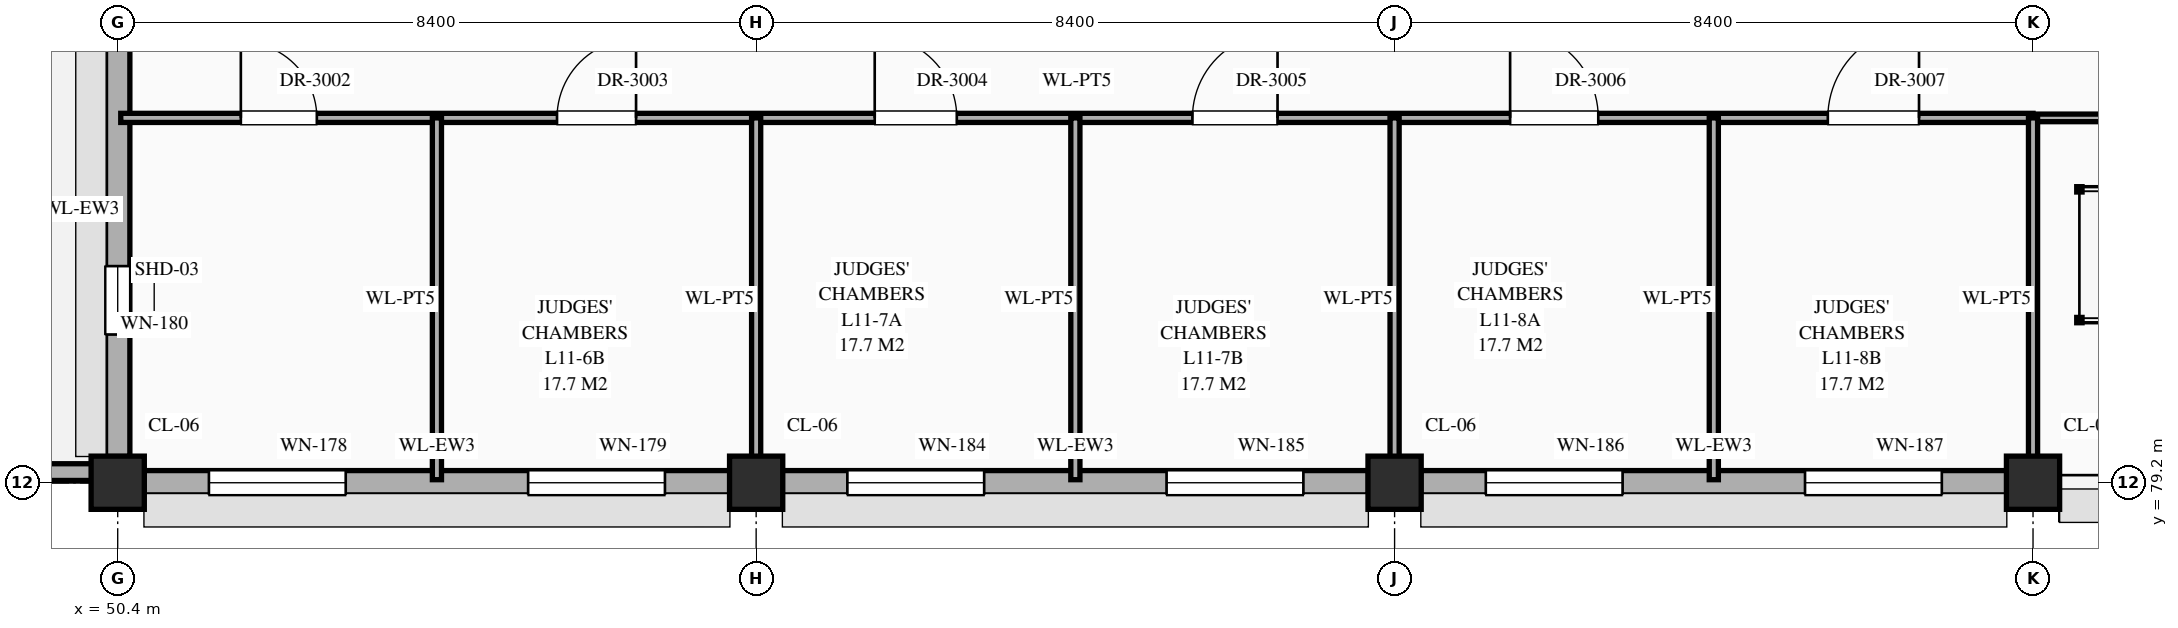
"""IFC4 building model, lengths in metres.
Left out: names, types, materials, properties, quantities, classifications, styles, units other than length and angle.
Written with IfcOpenShell. Run it as: python <this file> out.ifc"""

import sys

from ifc_helpers import new_model, si_unit, direction, frame, frame_2d, origin, origin_2d, place, context, subcontext, project, spatial, rectangle, extrude, element, fill, save


model = new_model("IFC4")
c1 = context("Model", 3, precision=1e-05, world=origin(), true_north=direction((0.0, 1.0)))
c2 = subcontext(c1, "Body", "Model", "MODEL_VIEW")
j1 = project(units=[si_unit("LENGTHUNIT", "METRE"), si_unit("PLANEANGLEUNIT", "RADIAN")], contexts=[c1])
p1 = place(None, origin())
s1 = spatial("IfcSite", under=j1, at=p1, CompositionType="ELEMENT")
p2 = place(p1, origin())
s2 = spatial("IfcBuilding", under=s1, at=p2, CompositionType="ELEMENT")
p3 = place(p2, frame((0.0, 0.0, 47.7)))
s3 = spatial("IfcBuildingStorey", under=s2, at=p3, CompositionType="ELEMENT", Elevation=47.7)
for number, where, z_axis, x_axis in (
    (1, (50.4, 79.2, 0.0), (0.0, 0.0, 1.0), (1.0, 0.0, 0.0)),
    (2, (58.8, 79.2, 0.0), (0.0, 0.0, 1.0), (1.0, 0.0, 0.0)),
    (3, (67.2, 79.2, 0.0), (0.0, 0.0, 1.0), (1.0, 0.0, 0.0)),
    (4, (75.6, 79.2, 0.0), (0.0, 0.0, 1.0), (1.0, 0.0, 0.0)),
):
    element("IfcColumn", number, at=place(p3, frame(where, z_axis=z_axis, x_axis=x_axis)), inside=s3, PredefinedType="COLUMN", context=c2, shape_type="SweptSolid", body=[
        extrude(rectangle(XDim=0.7, YDim=0.7, at=origin_2d()), origin(), (0.0, 0.0, 1.0), 4.2),
    ])
p4 = place(p3, frame((50.745, 79.2, 0.0), z_axis=(0.0, 0.0, 1.0), x_axis=(1.0, 0.0, 0.0)))
e5 = element("IfcWall", 5, at=p4, inside=s3, PredefinedType="STANDARD", context=c2, shape_type="SweptSolid", body=[
    extrude(rectangle(XDim=7.71, YDim=0.32, at=frame_2d((3.855, 0.0))), origin(), (0.0, 0.0, 1.0), 3.31),
])
p5 = place(p4, frame((0.855, 0.0, 0.55)))
e6 = element("IfcOpeningElement", 6, at=p5, cuts=e5, PredefinedType="OPENING", context=c2, shape_type="SweptSolid", body=[
    extrude(rectangle(XDim=1.8, YDim=2.12, at=frame_2d((0.9, 1.06))), frame((0.0, 0.172, 0.0), z_axis=(0.0, -1.0, 0.0), x_axis=(1.0, 0.0, 0.0)), (0.0, 0.0, 1.0), 0.344),
])
p6 = place(p4, frame((5.055, 0.0, 0.55)))
e7 = element("IfcOpeningElement", 7, at=p6, cuts=e5, PredefinedType="OPENING", context=c2, shape_type="SweptSolid", body=[
    extrude(rectangle(XDim=1.8, YDim=2.12, at=frame_2d((0.9, 1.06))), frame((0.0, 0.172, 0.0), z_axis=(0.0, -1.0, 0.0), x_axis=(1.0, 0.0, 0.0)), (0.0, 0.0, 1.0), 0.344),
])
p7 = place(p3, frame((50.4, 79.545, 0.0), z_axis=(0.0, 0.0, 1.0), x_axis=(0.0, 1.0, 0.0)))
e8 = element("IfcWall", 8, at=p7, inside=s3, PredefinedType="STANDARD", context=c2, shape_type="SweptSolid", body=[
    extrude(rectangle(XDim=6.51, YDim=0.32, at=frame_2d((3.255, 0.0))), origin(), (0.0, 0.0, 1.0), 3.31),
])
p8 = place(p7, frame((1.605, 0.0, 0.55)))
e9 = element("IfcOpeningElement", 9, at=p8, cuts=e8, PredefinedType="OPENING", context=c2, shape_type="SweptSolid", body=[
    extrude(rectangle(XDim=0.9, YDim=1.92, at=frame_2d((0.45, 0.96))), frame((0.0, 0.172, 0.0), z_axis=(0.0, -1.0, 0.0), x_axis=(1.0, 0.0, 0.0)), (0.0, 0.0, 1.0), 0.344),
])
p9 = place(p3, frame((59.145, 79.2, 0.0), z_axis=(0.0, 0.0, 1.0), x_axis=(1.0, 0.0, 0.0)))
e10 = element("IfcWall", 10, at=p9, inside=s3, PredefinedType="STANDARD", context=c2, shape_type="SweptSolid", body=[
    extrude(rectangle(XDim=7.71, YDim=0.32, at=frame_2d((3.855, 0.0))), origin(), (0.0, 0.0, 1.0), 3.31),
])
p10 = place(p9, frame((0.855, 0.0, 0.55)))
e11 = element("IfcOpeningElement", 11, at=p10, cuts=e10, PredefinedType="OPENING", context=c2, shape_type="SweptSolid", body=[
    extrude(rectangle(XDim=1.8, YDim=2.12, at=frame_2d((0.9, 1.06))), frame((0.0, 0.172, 0.0), z_axis=(0.0, -1.0, 0.0), x_axis=(1.0, 0.0, 0.0)), (0.0, 0.0, 1.0), 0.344),
])
p11 = place(p9, frame((5.055, 0.0, 0.55)))
e12 = element("IfcOpeningElement", 12, at=p11, cuts=e10, PredefinedType="OPENING", context=c2, shape_type="SweptSolid", body=[
    extrude(rectangle(XDim=1.8, YDim=2.12, at=frame_2d((0.9, 1.06))), frame((0.0, 0.172, 0.0), z_axis=(0.0, -1.0, 0.0), x_axis=(1.0, 0.0, 0.0)), (0.0, 0.0, 1.0), 0.344),
])
p12 = place(p3, frame((67.545, 79.2, 0.0), z_axis=(0.0, 0.0, 1.0), x_axis=(1.0, 0.0, 0.0)))
e13 = element("IfcWall", 13, at=p12, inside=s3, PredefinedType="STANDARD", context=c2, shape_type="SweptSolid", body=[
    extrude(rectangle(XDim=7.71, YDim=0.32, at=frame_2d((3.855, 0.0))), origin(), (0.0, 0.0, 1.0), 3.31),
])
p13 = place(p12, frame((0.855, 0.0, 0.55)))
e14 = element("IfcOpeningElement", 14, at=p13, cuts=e13, PredefinedType="OPENING", context=c2, shape_type="SweptSolid", body=[
    extrude(rectangle(XDim=1.8, YDim=2.12, at=frame_2d((0.9, 1.06))), frame((0.0, 0.172, 0.0), z_axis=(0.0, -1.0, 0.0), x_axis=(1.0, 0.0, 0.0)), (0.0, 0.0, 1.0), 0.344),
])
p14 = place(p12, frame((5.055, 0.0, 0.55)))
e15 = element("IfcOpeningElement", 15, at=p14, cuts=e13, PredefinedType="OPENING", context=c2, shape_type="SweptSolid", body=[
    extrude(rectangle(XDim=1.8, YDim=2.12, at=frame_2d((0.9, 1.06))), frame((0.0, 0.172, 0.0), z_axis=(0.0, -1.0, 0.0), x_axis=(1.0, 0.0, 0.0)), (0.0, 0.0, 1.0), 0.344),
])
p15 = place(p3, frame((42.14, 79.34, 0.0), z_axis=(0.0, 0.0, 1.0), x_axis=(1.0, 0.0, 0.0)))
e16 = element("IfcWall", 16, at=p15, inside=s3, PredefinedType="PARAPET", context=c2, shape_type="SweptSolid", body=[
    extrude(rectangle(XDim=7.96, YDim=0.22, at=frame_2d((3.98, 0.0))), origin(), (0.0, 0.0, 1.0), 1.2),
])
p16 = place(p3, frame((50.44, 84.0, 0.0), z_axis=(0.0, 0.0, 1.0), x_axis=(1.0, 0.0, 0.0)))
e17 = element("IfcWall", 17, at=p16, inside=s3, PredefinedType="STANDARD", context=c2, shape_type="SweptSolid", body=[
    extrude(rectangle(XDim=25.16, YDim=0.12, at=frame_2d((12.58, 0.0))), origin(), (0.0, 0.0, 1.0), 3.96),
])
p17 = place(p16, frame((1.58, 0.0, 0.0)))
e18 = element("IfcOpeningElement", 18, at=p17, cuts=e17, PredefinedType="OPENING", context=c2, shape_type="SweptSolid", body=[
    extrude(rectangle(XDim=1.0, YDim=2.25, at=frame_2d((0.5, 1.125))), frame((0.0, 0.072, 0.0), z_axis=(0.0, -1.0, 0.0), x_axis=(1.0, 0.0, 0.0)), (0.0, 0.0, 1.0), 0.144),
])
p18 = place(p16, frame((5.74, 0.0, 0.0)))
e19 = element("IfcOpeningElement", 19, at=p18, cuts=e17, PredefinedType="OPENING", context=c2, shape_type="SweptSolid", body=[
    extrude(rectangle(XDim=1.04, YDim=2.2, at=frame_2d((0.52, 1.1))), frame((0.0, 0.072, 0.0), z_axis=(0.0, -1.0, 0.0), x_axis=(1.0, 0.0, 0.0)), (0.0, 0.0, 1.0), 0.144),
])
p19 = place(p16, frame((9.92, 0.0, 0.0)))
e20 = element("IfcOpeningElement", 20, at=p19, cuts=e17, PredefinedType="OPENING", context=c2, shape_type="SweptSolid", body=[
    extrude(rectangle(XDim=1.08, YDim=2.25, at=frame_2d((0.54, 1.125))), frame((0.0, 0.072, 0.0), z_axis=(0.0, -1.0, 0.0), x_axis=(1.0, 0.0, 0.0)), (0.0, 0.0, 1.0), 0.144),
])
p20 = place(p16, frame((14.1, 0.0, 0.0)))
e21 = element("IfcOpeningElement", 21, at=p20, cuts=e17, PredefinedType="OPENING", context=c2, shape_type="SweptSolid", body=[
    extrude(rectangle(XDim=1.12, YDim=2.25, at=frame_2d((0.56, 1.125))), frame((0.0, 0.072, 0.0), z_axis=(0.0, -1.0, 0.0), x_axis=(1.0, 0.0, 0.0)), (0.0, 0.0, 1.0), 0.144),
])
p21 = place(p16, frame((18.28, 0.0, 0.0)))
e22 = element("IfcOpeningElement", 22, at=p21, cuts=e17, PredefinedType="OPENING", context=c2, shape_type="SweptSolid", body=[
    extrude(rectangle(XDim=1.16, YDim=2.3, at=frame_2d((0.58, 1.15))), frame((0.0, 0.072, 0.0), z_axis=(0.0, -1.0, 0.0), x_axis=(1.0, 0.0, 0.0)), (0.0, 0.0, 1.0), 0.144),
])
p22 = place(p16, frame((22.46, 0.0, 0.0)))
e23 = element("IfcOpeningElement", 23, at=p22, cuts=e17, PredefinedType="OPENING", context=c2, shape_type="SweptSolid", body=[
    extrude(rectangle(XDim=1.2, YDim=2.35, at=frame_2d((0.6, 1.175))), frame((0.0, 0.072, 0.0), z_axis=(0.0, -1.0, 0.0), x_axis=(1.0, 0.0, 0.0)), (0.0, 0.0, 1.0), 0.144),
])
p23 = place(p3, frame((75.6, 84.0, 0.0), z_axis=(0.0, 0.0, 1.0), x_axis=(1.0, 0.0, 0.0)))
e24 = element("IfcWall", 24, at=p23, inside=s3, PredefinedType="STANDARD", context=c2, shape_type="SweptSolid", body=[
    extrude(rectangle(XDim=16.8, YDim=0.1, at=frame_2d((8.4, 0.0))), origin(), (0.0, 0.0, 1.0), 3.96),
])
p24 = place(p23, frame((3.58, 0.0, 0.0)))
e25 = element("IfcOpeningElement", 25, at=p24, cuts=e24, PredefinedType="OPENING", context=c2, shape_type="SweptSolid", body=[
    extrude(rectangle(XDim=1.24, YDim=2.3, at=frame_2d((0.62, 1.15))), frame((0.0, 0.062, 0.0), z_axis=(0.0, -1.0, 0.0), x_axis=(1.0, 0.0, 0.0)), (0.0, 0.0, 1.0), 0.124),
])
p25 = place(p23, frame((11.96, 0.0, 0.0)))
e26 = element("IfcOpeningElement", 26, at=p25, cuts=e24, PredefinedType="OPENING", context=c2, shape_type="SweptSolid", body=[
    extrude(rectangle(XDim=1.28, YDim=2.35, at=frame_2d((0.64, 1.175))), frame((0.0, 0.062, 0.0), z_axis=(0.0, -1.0, 0.0), x_axis=(1.0, 0.0, 0.0)), (0.0, 0.0, 1.0), 0.124),
])
p26 = place(p3, frame((54.6, 79.24, 0.0), z_axis=(0.0, 0.0, 1.0), x_axis=(0.0, 1.0, 0.0)))
e27 = element("IfcWall", 27, at=p26, inside=s3, PredefinedType="STANDARD", context=c2, shape_type="SweptSolid", body=[
    extrude(rectangle(XDim=4.76, YDim=0.12, at=frame_2d((2.38, 0.0))), origin(), (0.0, 0.0, 1.0), 3.96),
])
p27 = place(p3, frame((58.8, 79.24, 0.0), z_axis=(0.0, 0.0, 1.0), x_axis=(0.0, 1.0, 0.0)))
e28 = element("IfcWall", 28, at=p27, inside=s3, PredefinedType="STANDARD", context=c2, shape_type="SweptSolid", body=[
    extrude(rectangle(XDim=4.76, YDim=0.12, at=frame_2d((2.38, 0.0))), origin(), (0.0, 0.0, 1.0), 3.21),
])
p28 = place(p3, frame((63.0, 79.24, 0.0), z_axis=(0.0, 0.0, 1.0), x_axis=(0.0, 1.0, 0.0)))
e29 = element("IfcWall", 29, at=p28, inside=s3, PredefinedType="STANDARD", context=c2, shape_type="SweptSolid", body=[
    extrude(rectangle(XDim=4.76, YDim=0.12, at=frame_2d((2.38, 0.0))), origin(), (0.0, 0.0, 1.0), 3.61),
])
p29 = place(p3, frame((67.2, 79.24, 0.0), z_axis=(0.0, 0.0, 1.0), x_axis=(0.0, 1.0, 0.0)))
e30 = element("IfcWall", 30, at=p29, inside=s3, PredefinedType="STANDARD", context=c2, shape_type="SweptSolid", body=[
    extrude(rectangle(XDim=4.76, YDim=0.12, at=frame_2d((2.38, 0.0))), origin(), (0.0, 0.0, 1.0), 3.21),
])
p30 = place(p3, frame((71.4, 79.24, 0.0), z_axis=(0.0, 0.0, 1.0), x_axis=(0.0, 1.0, 0.0)))
e31 = element("IfcWall", 31, at=p30, inside=s3, PredefinedType="STANDARD", context=c2, shape_type="SweptSolid", body=[
    extrude(rectangle(XDim=4.76, YDim=0.12, at=frame_2d((2.38, 0.0))), origin(), (0.0, 0.0, 1.0), 3.96),
])
p31 = place(p3, frame((75.6, 79.24, 0.0), z_axis=(0.0, 0.0, 1.0), x_axis=(0.0, 1.0, 0.0)))
e32 = element("IfcWall", 32, at=p31, inside=s3, PredefinedType="STANDARD", context=c2, shape_type="SweptSolid", body=[
    extrude(rectangle(XDim=4.76, YDim=0.12, at=frame_2d((2.38, 0.0))), origin(), (0.0, 0.0, 1.0), 3.21),
])
p32 = place(p5, origin())
e33 = element("IfcWindow", 33, at=p32, inside=s3, PartitioningType="SINGLE_PANEL", PredefinedType="WINDOW", context=c2, shape_type="SweptSolid", body=[
    extrude(rectangle(XDim=1.8, YDim=2.12, at=frame_2d((0.9, 1.06))), frame((0.0, 0.03, 0.0), z_axis=(0.0, -1.0, 0.0), x_axis=(1.0, 0.0, 0.0)), (0.0, 0.0, 1.0), 0.06),
])
fill(e6, e33)
p33 = place(p6, origin())
e34 = element("IfcWindow", 34, at=p33, inside=s3, PartitioningType="SINGLE_PANEL", PredefinedType="WINDOW", context=c2, shape_type="SweptSolid", body=[
    extrude(rectangle(XDim=1.8, YDim=2.12, at=frame_2d((0.9, 1.06))), frame((0.0, 0.03, 0.0), z_axis=(0.0, -1.0, 0.0), x_axis=(1.0, 0.0, 0.0)), (0.0, 0.0, 1.0), 0.06),
])
fill(e7, e34)
p34 = place(p8, origin())
e35 = element("IfcWindow", 35, at=p34, inside=s3, PartitioningType="SINGLE_PANEL", PredefinedType="WINDOW", context=c2, shape_type="SweptSolid", body=[
    extrude(rectangle(XDim=0.9, YDim=1.92, at=frame_2d((0.45, 0.96))), frame((0.0, 0.03, 0.0), z_axis=(0.0, -1.0, 0.0), x_axis=(1.0, 0.0, 0.0)), (0.0, 0.0, 1.0), 0.06),
])
fill(e9, e35)
p35 = place(p10, origin())
e36 = element("IfcWindow", 36, at=p35, inside=s3, PartitioningType="SINGLE_PANEL", PredefinedType="WINDOW", context=c2, shape_type="SweptSolid", body=[
    extrude(rectangle(XDim=1.8, YDim=2.12, at=frame_2d((0.9, 1.06))), frame((0.0, 0.03, 0.0), z_axis=(0.0, -1.0, 0.0), x_axis=(1.0, 0.0, 0.0)), (0.0, 0.0, 1.0), 0.06),
])
fill(e11, e36)
p36 = place(p11, origin())
e37 = element("IfcWindow", 37, at=p36, inside=s3, PartitioningType="SINGLE_PANEL", PredefinedType="WINDOW", context=c2, shape_type="SweptSolid", body=[
    extrude(rectangle(XDim=1.8, YDim=2.12, at=frame_2d((0.9, 1.06))), frame((0.0, 0.03, 0.0), z_axis=(0.0, -1.0, 0.0), x_axis=(1.0, 0.0, 0.0)), (0.0, 0.0, 1.0), 0.06),
])
fill(e12, e37)
p37 = place(p13, origin())
e38 = element("IfcWindow", 38, at=p37, inside=s3, PartitioningType="SINGLE_PANEL", PredefinedType="WINDOW", context=c2, shape_type="SweptSolid", body=[
    extrude(rectangle(XDim=1.8, YDim=2.12, at=frame_2d((0.9, 1.06))), frame((0.0, 0.03, 0.0), z_axis=(0.0, -1.0, 0.0), x_axis=(1.0, 0.0, 0.0)), (0.0, 0.0, 1.0), 0.06),
])
fill(e14, e38)
p38 = place(p14, origin())
e39 = element("IfcWindow", 39, at=p38, inside=s3, PartitioningType="SINGLE_PANEL", PredefinedType="WINDOW", context=c2, shape_type="SweptSolid", body=[
    extrude(rectangle(XDim=1.8, YDim=2.12, at=frame_2d((0.9, 1.06))), frame((0.0, 0.03, 0.0), z_axis=(0.0, -1.0, 0.0), x_axis=(1.0, 0.0, 0.0)), (0.0, 0.0, 1.0), 0.06),
])
fill(e15, e39)
p39 = place(p17, origin())
e40 = element("IfcDoor", 40, at=p39, inside=s3, OperationType="SINGLE_SWING_LEFT", PredefinedType="DOOR", context=c2, shape_type="SweptSolid", body=[
    extrude(rectangle(XDim=1.0, YDim=2.25, at=frame_2d((0.5, 1.125))), frame((0.0, 0.025, 0.0), z_axis=(0.0, -1.0, 0.0), x_axis=(1.0, 0.0, 0.0)), (0.0, 0.0, 1.0), 0.05),
])
fill(e18, e40)
p40 = place(p18, origin())
e41 = element("IfcDoor", 41, at=p40, inside=s3, OperationType="SINGLE_SWING_RIGHT", PredefinedType="DOOR", context=c2, shape_type="SweptSolid", body=[
    extrude(rectangle(XDim=1.04, YDim=2.2, at=frame_2d((0.52, 1.1))), frame((0.0, 0.025, 0.0), z_axis=(0.0, -1.0, 0.0), x_axis=(1.0, 0.0, 0.0)), (0.0, 0.0, 1.0), 0.05),
])
fill(e19, e41)
p41 = place(p19, origin())
e42 = element("IfcDoor", 42, at=p41, inside=s3, OperationType="SINGLE_SWING_LEFT", PredefinedType="DOOR", context=c2, shape_type="SweptSolid", body=[
    extrude(rectangle(XDim=1.08, YDim=2.25, at=frame_2d((0.54, 1.125))), frame((0.0, 0.025, 0.0), z_axis=(0.0, -1.0, 0.0), x_axis=(1.0, 0.0, 0.0)), (0.0, 0.0, 1.0), 0.05),
])
fill(e20, e42)
p42 = place(p20, origin())
e43 = element("IfcDoor", 43, at=p42, inside=s3, OperationType="SINGLE_SWING_RIGHT", PredefinedType="DOOR", context=c2, shape_type="SweptSolid", body=[
    extrude(rectangle(XDim=1.12, YDim=2.25, at=frame_2d((0.56, 1.125))), frame((0.0, 0.025, 0.0), z_axis=(0.0, -1.0, 0.0), x_axis=(1.0, 0.0, 0.0)), (0.0, 0.0, 1.0), 0.05),
])
fill(e21, e43)
p43 = place(p21, origin())
e44 = element("IfcDoor", 44, at=p43, inside=s3, OperationType="SINGLE_SWING_LEFT", PredefinedType="DOOR", context=c2, shape_type="SweptSolid", body=[
    extrude(rectangle(XDim=1.16, YDim=2.3, at=frame_2d((0.58, 1.15))), frame((0.0, 0.025, 0.0), z_axis=(0.0, -1.0, 0.0), x_axis=(1.0, 0.0, 0.0)), (0.0, 0.0, 1.0), 0.05),
])
fill(e22, e44)
p44 = place(p22, origin())
e45 = element("IfcDoor", 45, at=p44, inside=s3, OperationType="SINGLE_SWING_RIGHT", PredefinedType="DOOR", context=c2, shape_type="SweptSolid", body=[
    extrude(rectangle(XDim=1.2, YDim=2.35, at=frame_2d((0.6, 1.175))), frame((0.0, 0.025, 0.0), z_axis=(0.0, -1.0, 0.0), x_axis=(1.0, 0.0, 0.0)), (0.0, 0.0, 1.0), 0.05),
])
fill(e23, e45)
save(model, sys.argv[1])
